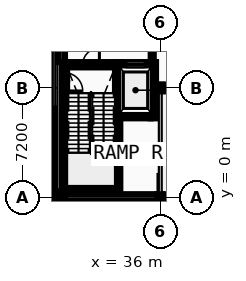
"""IFC4 building model, lengths in metres.
Left out: names, types, materials, properties, quantities, classifications, styles, units other than length and angle.
Written with IfcOpenShell. Run it as: python <this file> out.ifc"""

import sys

from ifc_helpers import new_model, si_unit, direction, frame, frame_2d, origin, origin_2d, place, context, subcontext, project, spatial, rectangle, hollow_circle, i_section, extrude, element, fill, save


model = new_model("IFC4")
c1 = context("Model", 3, precision=1e-05, world=origin(), true_north=direction((0.0, 1.0)))
c2 = subcontext(c1, "Body", "Model", "MODEL_VIEW")
j1 = project(units=[si_unit("LENGTHUNIT", "METRE"), si_unit("PLANEANGLEUNIT", "RADIAN")], contexts=[c1])
p1 = place(None, origin())
s1 = spatial("IfcSite", under=j1, at=p1, CompositionType="ELEMENT")
p2 = place(p1, origin())
s2 = spatial("IfcBuilding", under=s1, at=p2, CompositionType="ELEMENT")
p3 = place(p2, origin())
s3 = spatial("IfcBuildingStorey", under=s2, at=p3, CompositionType="ELEMENT", Elevation=0.0)
p4 = place(p3, frame((28.8, 0.0, 0.0), z_axis=(0.0, 0.0, 1.0), x_axis=(1.0, 0.0, 0.0)))
e1 = element("IfcColumn", 1, at=p4, inside=s3, PredefinedType="COLUMN", context=c2, shape_type="SweptSolid", body=[
    extrude(i_section(OverallWidth=0.3, OverallDepth=0.5, WebThickness=0.014, FlangeThickness=0.028, FilletRadius=0.027, at=origin_2d()), origin(), (0.0, 0.0, 1.0), 5.2),
])
p5 = place(p3, frame((29.52, 0.0, 0.0), z_axis=(0.0, 0.0, 1.0), x_axis=(1.0, 0.0, 0.0)))
e2 = element("IfcColumn", 2, at=p5, inside=s3, PredefinedType="COLUMN", context=c2, shape_type="SweptSolid", body=[
    extrude(i_section(OverallWidth=0.3, OverallDepth=0.45, WebThickness=0.014, FlangeThickness=0.026, FilletRadius=0.027, at=origin_2d()), origin(), (0.0, 0.0, 1.0), 5.2),
])
p6 = place(p3, frame((36.0, 0.0, 0.0), z_axis=(0.0, 0.0, 1.0), x_axis=(1.0, 0.0, 0.0)))
e3 = element("IfcColumn", 3, at=p6, inside=s3, PredefinedType="COLUMN", context=c2, shape_type="SweptSolid", body=[
    extrude(hollow_circle(Radius=0.203, WallThickness=0.016, at=origin_2d()), origin(), (0.0, 0.0, 1.0), 5.2),
])
p7 = place(p3, frame((36.0, 7.2, 0.0), z_axis=(0.0, 0.0, 1.0), x_axis=(1.0, 0.0, 0.0)))
e4 = element("IfcColumn", 4, at=p7, inside=s3, PredefinedType="COLUMN", context=c2, shape_type="SweptSolid", body=[
    extrude(i_section(OverallWidth=0.3, OverallDepth=0.45, WebThickness=0.014, FlangeThickness=0.026, FilletRadius=0.027, at=origin_2d()), origin(), (0.0, 0.0, 1.0), 5.2),
])
p8 = place(p3, frame((28.8, -0.21, 0.0), z_axis=(0.0, 0.0, 1.0), x_axis=(0.0, 1.0, 0.0)))
e5 = element("IfcWall", 5, at=p8, inside=s3, PredefinedType="STANDARD", context=c2, shape_type="SweptSolid", body=[
    extrude(rectangle(XDim=6.06, YDim=0.42, at=frame_2d((3.03, 0.0))), origin(), (0.0, 0.0, 1.0), 4.97),
])
p9 = place(p8, frame((2.549, 0.0, 0.95)))
e6 = element("IfcOpeningElement", 6, at=p9, cuts=e5, PredefinedType="OPENING", context=c2, shape_type="SweptSolid", body=[
    extrude(rectangle(XDim=0.962, YDim=1.26, at=frame_2d((0.481, 0.63))), frame((0.0, 0.22, 0.0), z_axis=(0.0, -1.0, 0.0), x_axis=(1.0, 0.0, 0.0)), (0.0, 0.0, 1.0), 0.44),
])
p10 = place(p3, frame((29.73, 0.0, 0.0), z_axis=(0.0, 0.0, 1.0), x_axis=(1.0, 0.0, 0.0)))
e7 = element("IfcWall", 7, at=p10, inside=s3, PredefinedType="STANDARD", context=c2, shape_type="SweptSolid", body=[
    extrude(rectangle(XDim=6.38, YDim=0.42, at=frame_2d((3.19, 0.0))), origin(), (0.0, 0.0, 1.0), 4.665),
])
p11 = place(p3, frame((36.07, 7.2, 0.0), z_axis=(0.0, 0.0, 1.0), x_axis=(1.0, 0.0, 0.0)))
e8 = element("IfcWall", 8, at=p11, inside=s3, PredefinedType="STANDARD", context=c2, shape_type="SweptSolid", body=[
    extrude(rectangle(XDim=6.984, YDim=0.42, at=frame_2d((3.492, 0.0))), origin(), (0.0, 0.0, 1.0), 4.665),
])
p12 = place(p11, frame((4.034, 0.0, 0.0)))
e9 = element("IfcOpeningElement", 9, at=p12, cuts=e8, PredefinedType="OPENING", context=c2, shape_type="SweptSolid", body=[
    extrude(rectangle(XDim=2.1, YDim=2.4, at=frame_2d((1.05, 1.2))), frame((0.0, 0.22, 0.0), z_axis=(0.0, -1.0, 0.0), x_axis=(1.0, 0.0, 0.0)), (0.0, 0.0, 1.0), 0.44),
])
p13 = place(p3, frame((29.52, 0.4, 0.0), z_axis=(0.0, 0.0, 1.0), x_axis=(0.0, -1.0, 0.0)))
e10 = element("IfcWall", 10, at=p13, inside=s3, PredefinedType="STANDARD", context=c2, shape_type="SweptSolid", body=[
    extrude(rectangle(XDim=0.61, YDim=0.42, at=frame_2d((0.305, 0.0))), origin(), (0.0, 0.0, 1.0), 4.97),
])
p14 = place(p3, frame((29.52, 14.4, 0.0), z_axis=(0.0, 0.0, 1.0), x_axis=(0.0, -1.0, 0.0)))
e11 = element("IfcWall", 11, at=p14, inside=s3, PredefinedType="STANDARD", context=c2, shape_type="SweptSolid", body=[
    extrude(rectangle(XDim=5.5, YDim=0.42, at=frame_2d((2.75, 0.0))), origin(), (0.0, 0.0, 1.0), 4.97),
])
p15 = place(p3, frame((29.87, 0.575, 0.0), z_axis=(0.0, 0.0, 1.0), x_axis=(1.0, 0.0, 0.0)))
e12 = element("IfcWall", 12, at=p15, inside=s3, PredefinedType="SHEAR", context=c2, shape_type="SweptSolid", body=[
    extrude(rectangle(XDim=3.15, YDim=0.35, at=frame_2d((1.575, 0.0))), origin(), (0.0, 0.0, 1.0), 4.97),
])
p16 = place(p3, frame((29.87, 8.725, 0.0), z_axis=(0.0, 0.0, 1.0), x_axis=(1.0, 0.0, 0.0)))
e13 = element("IfcWall", 13, at=p16, inside=s3, PredefinedType="SHEAR", context=c2, shape_type="SweptSolid", body=[
    extrude(rectangle(XDim=3.15, YDim=0.35, at=frame_2d((1.575, 0.0))), origin(), (0.0, 0.0, 1.0), 4.97),
])
p17 = place(p16, frame((1.025, 0.0, 0.0)))
e14 = element("IfcOpeningElement", 14, at=p17, cuts=e13, PredefinedType="OPENING", context=c2, shape_type="SweptSolid", body=[
    extrude(rectangle(XDim=1.1, YDim=2.15, at=frame_2d((0.55, 1.075))), frame((0.0, 0.185, 0.0), z_axis=(0.0, -1.0, 0.0), x_axis=(1.0, 0.0, 0.0)), (0.0, 0.0, 1.0), 0.37),
])
p18 = place(p3, frame((29.695, 0.4, 0.0), z_axis=(0.0, 0.0, 1.0), x_axis=(0.0, 1.0, 0.0)))
e15 = element("IfcWall", 15, at=p18, inside=s3, PredefinedType="SHEAR", context=c2, shape_type="SweptSolid", body=[
    extrude(rectangle(XDim=8.5, YDim=0.35, at=frame_2d((4.25, 0.0))), origin(), (0.0, 0.0, 1.0), 4.97),
])
p19 = place(p18, frame((6.6, 0.0, 0.0)))
e16 = element("IfcOpeningElement", 16, at=p19, cuts=e15, PredefinedType="OPENING", context=c2, shape_type="SweptSolid", body=[
    extrude(rectangle(XDim=1.2, YDim=2.15, at=frame_2d((0.6, 1.075))), frame((0.0, 0.185, 0.0), z_axis=(0.0, -1.0, 0.0), x_axis=(1.0, 0.0, 0.0)), (0.0, 0.0, 1.0), 0.37),
])
p20 = place(p3, frame((33.195, 0.4, 0.0), z_axis=(0.0, 0.0, 1.0), x_axis=(0.0, 1.0, 0.0)))
e17 = element("IfcWall", 17, at=p20, inside=s3, PredefinedType="SHEAR", context=c2, shape_type="SweptSolid", body=[
    extrude(rectangle(XDim=8.5, YDim=0.35, at=frame_2d((4.25, 0.0))), origin(), (0.0, 0.0, 1.0), 4.97),
])
p21 = place(p3, frame((33.37, 5.375, 0.0), z_axis=(0.0, 0.0, 1.0), x_axis=(1.0, 0.0, 0.0)))
e18 = element("IfcWall", 18, at=p21, inside=s3, PredefinedType="SHEAR", context=c2, shape_type="SweptSolid", body=[
    extrude(rectangle(XDim=2.0, YDim=0.35, at=frame_2d((1.0, 0.0))), origin(), (0.0, 0.0, 1.0), 4.97),
])
p22 = place(p3, frame((33.37, 8.725, 0.0), z_axis=(0.0, 0.0, 1.0), x_axis=(1.0, 0.0, 0.0)))
e19 = element("IfcWall", 19, at=p22, inside=s3, PredefinedType="SHEAR", context=c2, shape_type="SweptSolid", body=[
    extrude(rectangle(XDim=2.0, YDim=0.35, at=frame_2d((1.0, 0.0))), origin(), (0.0, 0.0, 1.0), 4.97),
])
p23 = place(p22, frame((0.4, 0.0, 0.0)))
e20 = element("IfcOpeningElement", 20, at=p23, cuts=e19, PredefinedType="OPENING", context=c2, shape_type="SweptSolid", body=[
    extrude(rectangle(XDim=1.2, YDim=2.2, at=frame_2d((0.6, 1.1))), frame((0.0, 0.185, 0.0), z_axis=(0.0, -1.0, 0.0), x_axis=(1.0, 0.0, 0.0)), (0.0, 0.0, 1.0), 0.37),
])
p24 = place(p3, frame((35.545, 5.2, 0.0), z_axis=(0.0, 0.0, 1.0), x_axis=(0.0, 1.0, 0.0)))
e21 = element("IfcWall", 21, at=p24, inside=s3, PredefinedType="SHEAR", context=c2, shape_type="SweptSolid", body=[
    extrude(rectangle(XDim=3.7, YDim=0.35, at=frame_2d((1.85, 0.0))), origin(), (0.0, 0.0, 1.0), 4.97),
])
p25 = place(p3, frame((35.47, 8.9, 0.0), z_axis=(0.0, 0.0, 1.0), x_axis=(0.0, 1.0, 0.0)))
e22 = element("IfcWall", 22, at=p25, inside=s3, PredefinedType="PARTITIONING", context=c2, shape_type="SweptSolid", body=[
    extrude(rectangle(XDim=2.45, YDim=0.2, at=frame_2d((1.225, 0.0))), origin(), (0.0, 0.0, 1.0), 4.97),
])
p26 = place(p17, frame((1.1, 0.0, 0.0), z_axis=(0.0, 0.0, 1.0), x_axis=(-1.0, 0.0, 0.0)))
e23 = element("IfcDoor", 23, at=p26, inside=s3, OperationType="SINGLE_SWING_RIGHT", PredefinedType="DOOR", context=c2, shape_type="SweptSolid", body=[
    extrude(rectangle(XDim=1.1, YDim=2.15, at=frame_2d((0.55, 1.075))), frame((0.0, 0.025, 0.0), z_axis=(0.0, -1.0, 0.0), x_axis=(1.0, 0.0, 0.0)), (0.0, 0.0, 1.0), 0.05),
])
fill(e14, e23)
p27 = place(p19, frame((1.2, 0.0, 0.0), z_axis=(0.0, 0.0, 1.0), x_axis=(-1.0, 0.0, 0.0)))
e24 = element("IfcDoor", 24, at=p27, inside=s3, OperationType="SINGLE_SWING_LEFT", PredefinedType="DOOR", context=c2, shape_type="SweptSolid", body=[
    extrude(rectangle(XDim=1.2, YDim=2.15, at=frame_2d((0.6, 1.075))), frame((0.0, 0.025, 0.0), z_axis=(0.0, -1.0, 0.0), x_axis=(1.0, 0.0, 0.0)), (0.0, 0.0, 1.0), 0.05),
])
fill(e16, e24)
p28 = place(p23, origin())
e25 = element("IfcDoor", 25, at=p28, inside=s3, OperationType="SLIDING_TO_RIGHT", PredefinedType="DOOR", context=c2, shape_type="SweptSolid", body=[
    extrude(rectangle(XDim=1.2, YDim=2.2, at=frame_2d((0.6, 1.1))), frame((0.0, 0.025, 0.0), z_axis=(0.0, -1.0, 0.0), x_axis=(1.0, 0.0, 0.0)), (0.0, 0.0, 1.0), 0.05),
])
fill(e20, e25)
save(model, sys.argv[1])
